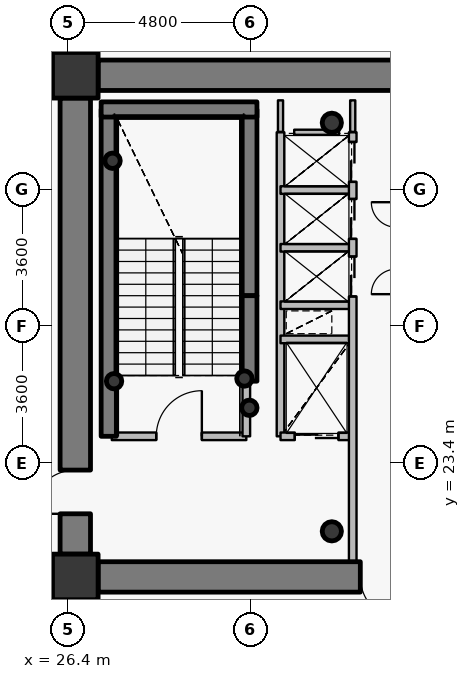
"""IFC4 building model, lengths in metres.
Left out: names, types, materials, properties, quantities, classifications, styles, units other than length and angle.
Written with IfcOpenShell. Run it as: python <this file> out.ifc"""

import sys

from ifc_helpers import new_model, si_unit, direction, frame, frame_2d, origin, origin_2d, place, context, subcontext, project, spatial, rectangle, hollow_circle, extrude, source, transform, mapped, element, fill, save


model = new_model("IFC4")
c1 = context("Model", 3, precision=1e-05, world=origin(), true_north=direction((0.0, 1.0)))
c2 = subcontext(c1, "Body", "Model", "MODEL_VIEW")
j1 = project(units=[si_unit("LENGTHUNIT", "METRE"), si_unit("PLANEANGLEUNIT", "RADIAN")], contexts=[c1])
p1 = place(None, origin())
s1 = spatial("IfcSite", under=j1, at=p1, CompositionType="ELEMENT")
p2 = place(p1, origin())
s2 = spatial("IfcBuilding", under=s1, at=p2, CompositionType="ELEMENT")
p3 = place(p2, frame((0.0, 0.0, 174.9)))
s3 = spatial("IfcBuildingStorey", under=s2, at=p3, CompositionType="ELEMENT", Elevation=174.9)
for number, where, z_axis, x_axis in (
    (1, (26.6, 20.4, 0.0), (0.0, 0.0, 1.0), (1.0, 0.0, 0.0)),
    (2, (26.6, 33.6, 0.0), (0.0, 0.0, 1.0), (1.0, 0.0, 0.0)),
):
    element("IfcColumn", number, at=place(p3, frame(where, z_axis=z_axis, x_axis=x_axis)), inside=s3, PredefinedType="COLUMN", context=c2, shape_type="SweptSolid", body=[
        extrude(rectangle(XDim=1.2, YDim=1.2, at=origin_2d()), origin(), (0.0, 0.0, 1.0), 3.75),
    ])
for number, where, z_axis, x_axis in (
    (3, (33.35, 21.6, 0.0), (0.0, 0.0, 1.0), (1.0, 0.0, 0.0)),
    (4, (33.35, 32.35, 0.0), (0.0, 0.0, 1.0), (1.0, 0.0, 0.0)),
):
    element("IfcColumn", number, at=place(p3, frame(where, z_axis=z_axis, x_axis=x_axis)), inside=s3, PredefinedType="COLUMN", context=c2, shape_type="SweptSolid", body=[
        extrude(hollow_circle(Radius=0.254, WallThickness=0.02, at=origin_2d()), origin(), (0.0, 0.0, 1.0), 3.75),
    ])
p4 = place(p3, frame((27.48, 24.1, 0.0), z_axis=(0.0, 0.0, 1.0), x_axis=(0.0, 1.0, 0.0)))
e5 = element("IfcWall", 5, at=p4, inside=s3, PredefinedType="SHEAR", context=c2, shape_type="SweptSolid", body=[
    extrude(rectangle(XDim=8.6, YDim=0.4, at=frame_2d((4.3, 0.0))), origin(), (0.0, 0.0, 1.0), 3.75),
])
p5 = place(p3, frame((31.18, 27.8, 0.0), z_axis=(0.0, 0.0, 1.0), x_axis=(0.0, 1.0, 0.0)))
e6 = element("IfcWall", 6, at=p5, inside=s3, PredefinedType="SHEAR", context=c2, shape_type="SweptSolid", body=[
    extrude(rectangle(XDim=4.9, YDim=0.4, at=frame_2d((2.45, 0.0))), origin(), (0.0, 0.0, 1.0), 3.75),
])
p6 = place(p3, frame((27.28, 32.7, 0.0), z_axis=(0.0, 0.0, 1.0), x_axis=(1.0, 0.0, 0.0)))
e7 = element("IfcWall", 7, at=p6, inside=s3, PredefinedType="SHEAR", context=c2, shape_type="SweptSolid", body=[
    extrude(rectangle(XDim=4.1, YDim=0.4, at=frame_2d((2.05, 0.0))), origin(), (0.0, 0.0, 1.0), 3.75),
])
for number, where, z_axis, x_axis in (
    (8, (27.58, 31.35, 0.0), (0.0, 0.0, 1.0), (1.0, 0.0, 0.0)),
    (9, (31.05, 25.62, 0.0), (0.0, 0.0, 1.0), (1.0, 0.0, 0.0)),
    (10, (31.18, 24.85, 0.0), (0.0, 0.0, 1.0), (1.0, 0.0, 0.0)),
    (11, (27.62, 25.55, 0.0), (0.0, 0.0, 1.0), (1.0, 0.0, 0.0)),
):
    element("IfcColumn", number, at=place(p3, frame(where, z_axis=z_axis, x_axis=x_axis)), inside=s3, PredefinedType="COLUMN", context=c2, shape_type="SweptSolid", body=[
        extrude(hollow_circle(Radius=0.203, WallThickness=0.016, at=origin_2d()), origin(), (0.0, 0.0, 1.0), 3.75),
    ])
p7 = place(p3, frame((27.2, 33.6, 0.0), z_axis=(0.0, 0.0, 1.0), x_axis=(1.0, 0.0, 0.0)))
e12 = element("IfcWall", 12, at=p7, inside=s3, PredefinedType="SHEAR", context=c2, shape_type="SweptSolid", body=[
    extrude(rectangle(XDim=17.6, YDim=0.8, at=frame_2d((8.8, 0.0))), origin(), (0.0, 0.0, 1.0), 2.95),
])
p8 = place(p7, frame((13.45, 0.0, 0.0)))
e13 = element("IfcOpeningElement", 13, at=p8, cuts=e12, PredefinedType="OPENING", context=c2, shape_type="SweptSolid", body=[
    extrude(rectangle(XDim=1.15, YDim=2.15, at=origin_2d()), frame((0.575, 0.41, 1.075), z_axis=(0.0, -1.0, 0.0), x_axis=(1.0, 0.0, 0.0)), (0.0, 0.0, 1.0), 0.82),
])
p9 = place(p3, frame((44.8, 20.4, 0.0), z_axis=(0.0, 0.0, 1.0), x_axis=(-1.0, 0.0, 0.0)))
e14 = element("IfcWall", 14, at=p9, inside=s3, PredefinedType="SHEAR", context=c2, shape_type="SweptSolid", body=[
    extrude(rectangle(XDim=17.6, YDim=0.8, at=frame_2d((8.8, 0.0))), origin(), (0.0, 0.0, 1.0), 2.95),
])
p10 = place(p9, frame((9.55, 0.0, 0.0)))
e15 = element("IfcOpeningElement", 15, at=p10, cuts=e14, PredefinedType="OPENING", context=c2, shape_type="SweptSolid", body=[
    extrude(rectangle(XDim=1.15, YDim=2.15, at=origin_2d()), frame((0.575, 0.41, 1.075), z_axis=(0.0, -1.0, 0.0), x_axis=(1.0, 0.0, 0.0)), (0.0, 0.0, 1.0), 0.82),
])
p11 = place(p3, frame((26.6, 21.0, 0.0), z_axis=(0.0, 0.0, 1.0), x_axis=(0.0, 1.0, 0.0)))
e16 = element("IfcWall", 16, at=p11, inside=s3, PredefinedType="SHEAR", context=c2, shape_type="SweptSolid", body=[
    extrude(rectangle(XDim=12.0, YDim=0.8, at=frame_2d((6.0, 0.0))), origin(), (0.0, 0.0, 1.0), 2.95),
])
p12 = place(p11, frame((1.061, 0.0, 0.0)))
e17 = element("IfcOpeningElement", 17, at=p12, cuts=e16, PredefinedType="OPENING", context=c2, shape_type="SweptSolid", body=[
    extrude(rectangle(XDim=1.15, YDim=2.15, at=origin_2d()), frame((0.575, 0.41, 1.075), z_axis=(0.0, -1.0, 0.0), x_axis=(1.0, 0.0, 0.0)), (0.0, 0.0, 1.0), 0.82),
])
p13 = place(p3, frame((31.18, 25.55, 0.0), z_axis=(0.0, 0.0, 1.0), x_axis=(0.0, 1.0, 0.0)))
e18 = element("IfcWall", 18, at=p13, inside=s3, PredefinedType="SHEAR", context=c2, shape_type="SweptSolid", body=[
    extrude(rectangle(XDim=2.25, YDim=0.4, at=frame_2d((1.125, 0.0))), origin(), (0.0, 0.0, 1.0), 3.1),
])
p14 = place(p3, frame((27.56, 24.1, 0.0), z_axis=(0.0, 0.0, 1.0), x_axis=(1.0, 0.0, 0.0)))
e19 = element("IfcWall", 19, at=p14, inside=s3, PredefinedType="PARTITIONING", context=c2, shape_type="SweptSolid", body=[
    extrude(rectangle(XDim=3.54, YDim=0.2, at=frame_2d((1.77, 0.0))), origin(), (0.0, 0.0, 1.0), 3.5),
])
p15 = place(p14, frame((1.17, 0.0, 0.0)))
e20 = element("IfcOpeningElement", 20, at=p15, cuts=e19, PredefinedType="OPENING", context=c2, shape_type="SweptSolid", body=[
    extrude(rectangle(XDim=1.2, YDim=2.15, at=origin_2d()), frame((0.6, 0.11, 1.075), z_axis=(0.0, -1.0, 0.0), x_axis=(1.0, 0.0, 0.0)), (0.0, 0.0, 1.0), 0.22),
])
p16 = place(p3, frame((31.1, 24.1, 0.0), z_axis=(0.0, 0.0, 1.0), x_axis=(0.0, 1.0, 0.0)))
e21 = element("IfcWall", 21, at=p16, inside=s3, PredefinedType="PARTITIONING", context=c2, shape_type="SweptSolid", body=[
    extrude(rectangle(XDim=1.44, YDim=0.2, at=frame_2d((0.72, 0.0))), origin(), (0.0, 0.0, 1.0), 3.5),
])
p17 = place(p3, frame((32.0, 24.1, 0.0), z_axis=(0.0, 0.0, 1.0), x_axis=(0.0, 1.0, 0.0)))
e22 = element("IfcWall", 22, at=p17, inside=s3, PredefinedType="PARTITIONING", context=c2, shape_type="SweptSolid", body=[
    extrude(rectangle(XDim=8.0, YDim=0.2, at=frame_2d((4.0, 0.0))), origin(), (0.0, 0.0, 1.0), 3.5),
])
p18 = place(p3, frame((32.0, 24.1, 0.0), z_axis=(0.0, 0.0, 1.0), x_axis=(1.0, 0.0, 0.0)))
e23 = element("IfcWall", 23, at=p18, inside=s3, PredefinedType="PARTITIONING", context=c2, shape_type="SweptSolid", body=[
    extrude(rectangle(XDim=1.9, YDim=0.2, at=frame_2d((0.95, 0.0))), origin(), (0.0, 0.0, 1.0), 3.085),
])
p19 = place(p18, frame((0.375, 0.0, 0.0)))
e24 = element("IfcOpeningElement", 24, at=p19, cuts=e23, PredefinedType="OPENING", context=c2, shape_type="SweptSolid", body=[
    extrude(rectangle(XDim=1.15, YDim=2.15, at=origin_2d()), frame((0.575, 0.11, 1.075), z_axis=(0.0, -1.0, 0.0), x_axis=(1.0, 0.0, 0.0)), (0.0, 0.0, 1.0), 0.22),
])
for number, where, z_axis, x_axis in (
    (25, (32.0, 26.65, 0.0), (0.0, 0.0, 1.0), (1.0, 0.0, 0.0)),
    (26, (32.0, 27.55, 0.0), (0.0, 0.0, 1.0), (1.0, 0.0, 0.0)),
    (27, (32.0, 29.06, 0.0), (0.0, 0.0, 1.0), (1.0, 0.0, 0.0)),
    (28, (32.0, 30.58, 0.0), (0.0, 0.0, 1.0), (1.0, 0.0, 0.0)),
):
    element("IfcWall", number, at=place(p3, frame(where, z_axis=z_axis, x_axis=x_axis)), inside=s3, PredefinedType="PARTITIONING", context=c2, shape_type="SweptSolid", body=[
        extrude(rectangle(XDim=1.9, YDim=0.2, at=frame_2d((0.95, 0.0))), origin(), (0.0, 0.0, 1.0), 3.085),
    ])
p20 = place(p3, frame((33.9, 20.8, 0.0), z_axis=(0.0, 0.0, 1.0), x_axis=(0.0, 1.0, 0.0)))
e29 = element("IfcWall", 29, at=p20, inside=s3, PredefinedType="PARTITIONING", context=c2, shape_type="SweptSolid", body=[
    extrude(rectangle(XDim=11.3, YDim=0.2, at=frame_2d((5.65, 0.0))), origin(), (0.0, 0.0, 1.0), 3.085),
])
p21 = place(p20, frame((6.98, 0.0, 0.0)))
e30 = element("IfcOpeningElement", 30, at=p21, cuts=e29, PredefinedType="OPENING", context=c2, shape_type="SweptSolid", body=[
    extrude(rectangle(XDim=1.05, YDim=2.15, at=origin_2d()), frame((0.525, 0.11, 1.075), z_axis=(0.0, -1.0, 0.0), x_axis=(1.0, 0.0, 0.0)), (0.0, 0.0, 1.0), 0.22),
])
p22 = place(p20, frame((8.495, 0.0, 0.0)))
e31 = element("IfcOpeningElement", 31, at=p22, cuts=e29, PredefinedType="OPENING", context=c2, shape_type="SweptSolid", body=[
    extrude(rectangle(XDim=1.05, YDim=2.15, at=origin_2d()), frame((0.525, 0.11, 1.075), z_axis=(0.0, -1.0, 0.0), x_axis=(1.0, 0.0, 0.0)), (0.0, 0.0, 1.0), 0.22),
])
p23 = place(p20, frame((9.995, 0.0, 0.0)))
e32 = element("IfcOpeningElement", 32, at=p23, cuts=e29, PredefinedType="OPENING", context=c2, shape_type="SweptSolid", body=[
    extrude(rectangle(XDim=1.05, YDim=2.15, at=origin_2d()), frame((0.525, 0.11, 1.075), z_axis=(0.0, -1.0, 0.0), x_axis=(1.0, 0.0, 0.0)), (0.0, 0.0, 1.0), 0.22),
])
p24 = place(p3, frame((32.36, 32.1, 0.0), z_axis=(0.0, 0.0, 1.0), x_axis=(1.0, 0.0, 0.0)))
e33 = element("IfcWall", 33, at=p24, inside=s3, PredefinedType="PARTITIONING", context=c2, shape_type="SweptSolid", body=[
    extrude(rectangle(XDim=1.18, YDim=0.135, at=frame_2d((0.59, 0.0))), origin(), (0.0, 0.0, 1.0), 3.085),
])
p25 = place(p3, frame((32.0, 32.94, 0.0), z_axis=(0.0, 0.0, 1.0), x_axis=(0.0, -1.0, 0.0)))
e34 = element("IfcWall", 34, at=p25, inside=s3, PredefinedType="PARTITIONING", context=c2, shape_type="SweptSolid", body=[
    extrude(rectangle(XDim=0.83, YDim=0.135, at=frame_2d((0.415, 0.0))), origin(), (0.0, 0.0, 1.0), 3.035),
])
p26 = place(p3, frame((33.9, 32.11, 0.0), z_axis=(0.0, 0.0, 1.0), x_axis=(0.0, 1.0, 0.0)))
e35 = element("IfcWall", 35, at=p26, inside=s3, PredefinedType="PARTITIONING", context=c2, shape_type="SweptSolid", body=[
    extrude(rectangle(XDim=0.83, YDim=0.135, at=frame_2d((0.415, 0.0))), origin(), (0.0, 0.0, 1.0), 3.085),
])
p27 = place(p3, frame((27.19, 34.0, 0.0), z_axis=(0.0, 0.0, 1.0), x_axis=(-1.0, 0.0, 0.0)))
e36 = element("IfcWall", 36, at=p27, inside=s3, PredefinedType="PARTITIONING", context=c2, shape_type="SweptSolid", body=[
    extrude(rectangle(XDim=0.99, YDim=0.135, at=frame_2d((0.495, 0.0))), origin(), (0.0, 0.0, 1.0), 2.935),
])
p28 = place(p3, frame((26.2, 33.692, 0.0), z_axis=(0.0, 0.0, 1.0), x_axis=(0.0, -1.0, 0.0)))
e37 = element("IfcWall", 37, at=p28, inside=s3, PredefinedType="PARTITIONING", context=c2, shape_type="SweptSolid", body=[
    extrude(rectangle(XDim=0.682, YDim=0.135, at=frame_2d((0.341, 0.0))), origin(), (0.0, 0.0, 1.0), 3.5),
])
p29 = place(p3, frame((26.2, 20.99, 0.0), z_axis=(0.0, 0.0, 1.0), x_axis=(0.0, -1.0, 0.0)))
e38 = element("IfcWall", 38, at=p29, inside=s3, PredefinedType="PARTITIONING", context=c2, shape_type="SweptSolid", body=[
    extrude(rectangle(XDim=0.99, YDim=0.135, at=frame_2d((0.495, 0.0))), origin(), (0.0, 0.0, 1.0), 3.5),
])
p30 = place(p3, frame((26.508, 20.0, 0.0), z_axis=(0.0, 0.0, 1.0), x_axis=(1.0, 0.0, 0.0)))
e39 = element("IfcWall", 39, at=p30, inside=s3, PredefinedType="PARTITIONING", context=c2, shape_type="SweptSolid", body=[
    extrude(rectangle(XDim=0.682, YDim=0.135, at=frame_2d((0.341, 0.0))), origin(), (0.0, 0.0, 1.0), 2.935),
])
m1 = source(origin(), c2, "Body", "SweptSolid", [
    extrude(rectangle(XDim=1.15, YDim=2.15, at=origin_2d()), frame((0.575, 0.025, 1.075), z_axis=(0.0, -1.0, 0.0), x_axis=(1.0, 0.0, 0.0)), (0.0, 0.0, 1.0), 0.05),
])
p31 = place(p12, origin())
e40 = element("IfcDoor", 40, at=p31, inside=s3, OperationType="SINGLE_SWING_LEFT", PredefinedType="DOOR", context=c2, shape_type="MappedRepresentation", body=[
    mapped(m1, transform((0.0, 0.0, 0.0), x_axis=(1.0, 0.0, 0.0), y_axis=(0.0, 1.0, 0.0), z_axis=(0.0, 0.0, 1.0), scale=1.0)),
])
fill(e17, e40)
p32 = place(p10, origin())
e41 = element("IfcDoor", 41, at=p32, inside=s3, OperationType="SINGLE_SWING_LEFT", PredefinedType="DOOR", context=c2, shape_type="MappedRepresentation", body=[
    mapped(m1, transform((0.0, 0.0, 0.0), x_axis=(1.0, 0.0, 0.0), y_axis=(0.0, 1.0, 0.0), z_axis=(0.0, 0.0, 1.0), scale=1.0)),
])
fill(e15, e41)
m2 = source(origin(), c2, "Body", "SweptSolid", [
    extrude(rectangle(XDim=1.2, YDim=2.15, at=origin_2d()), frame((0.6, 0.025, 1.075), z_axis=(0.0, -1.0, 0.0), x_axis=(1.0, 0.0, 0.0)), (0.0, 0.0, 1.0), 0.05),
])
p33 = place(p15, origin())
e42 = element("IfcDoor", 42, at=p33, inside=s3, OperationType="SINGLE_SWING_RIGHT", PredefinedType="DOOR", context=c2, shape_type="MappedRepresentation", body=[
    mapped(m2, transform((0.0, 0.0, 0.0), x_axis=(1.0, 0.0, 0.0), y_axis=(0.0, 1.0, 0.0), z_axis=(0.0, 0.0, 1.0), scale=1.0)),
])
fill(e20, e42)
m3 = source(origin(), c2, "Body", "SweptSolid", [
    extrude(rectangle(XDim=1.15, YDim=2.15, at=origin_2d()), frame((0.575, 0.025, 1.075), z_axis=(0.0, -1.0, 0.0), x_axis=(1.0, 0.0, 0.0)), (0.0, 0.0, 1.0), 0.05),
])
p34 = place(p19, origin())
e43 = element("IfcDoor", 43, at=p34, inside=s3, OperationType="DOUBLE_DOOR_SLIDING", PredefinedType="USERDEFINED", context=c2, shape_type="MappedRepresentation", body=[
    mapped(m3, transform((0.0, 0.0, 0.0), x_axis=(1.0, 0.0, 0.0), y_axis=(0.0, 1.0, 0.0), z_axis=(0.0, 0.0, 1.0), scale=1.0)),
])
fill(e24, e43)
m4 = source(origin(), c2, "Body", "SweptSolid", [
    extrude(rectangle(XDim=1.05, YDim=2.15, at=origin_2d()), frame((0.525, 0.025, 1.075), z_axis=(0.0, -1.0, 0.0), x_axis=(1.0, 0.0, 0.0)), (0.0, 0.0, 1.0), 0.05),
])
p35 = place(p21, origin())
e44 = element("IfcDoor", 44, at=p35, inside=s3, OperationType="DOUBLE_DOOR_SLIDING", PredefinedType="USERDEFINED", context=c2, shape_type="MappedRepresentation", body=[
    mapped(m4, transform((0.0, 0.0, 0.0), x_axis=(1.0, 0.0, 0.0), y_axis=(0.0, 1.0, 0.0), z_axis=(0.0, 0.0, 1.0), scale=1.0)),
])
fill(e30, e44)
p36 = place(p22, origin())
e45 = element("IfcDoor", 45, at=p36, inside=s3, OperationType="DOUBLE_DOOR_SLIDING", PredefinedType="USERDEFINED", context=c2, shape_type="MappedRepresentation", body=[
    mapped(m4, transform((0.0, 0.0, 0.0), x_axis=(1.0, 0.0, 0.0), y_axis=(0.0, 1.0, 0.0), z_axis=(0.0, 0.0, 1.0), scale=1.0)),
])
fill(e31, e45)
p37 = place(p23, origin())
e46 = element("IfcDoor", 46, at=p37, inside=s3, OperationType="DOUBLE_DOOR_SLIDING", PredefinedType="USERDEFINED", context=c2, shape_type="MappedRepresentation", body=[
    mapped(m4, transform((0.0, 0.0, 0.0), x_axis=(1.0, 0.0, 0.0), y_axis=(0.0, 1.0, 0.0), z_axis=(0.0, 0.0, 1.0), scale=1.0)),
])
fill(e32, e46)
save(model, sys.argv[1])
